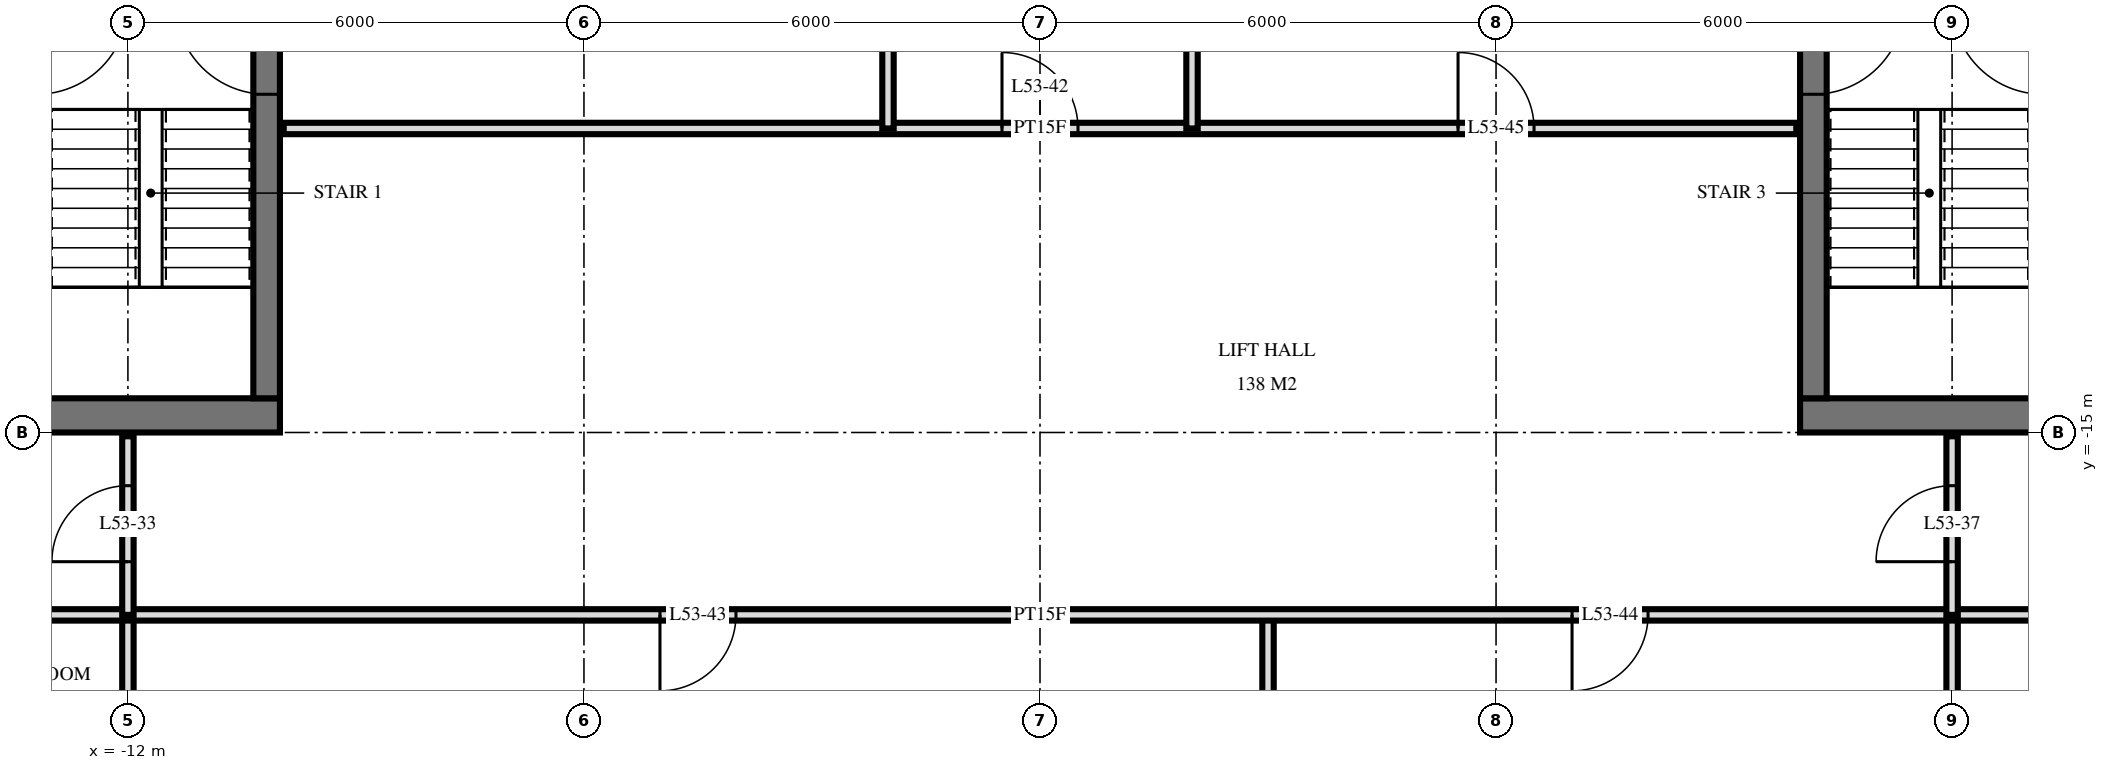
"""IFC4 building model, lengths in metres.
Left out: names, types, materials, properties, quantities, classifications, styles, units other than length and angle.
Written with IfcOpenShell. Run it as: python <this file> out.ifc"""

import sys

from ifc_helpers import new_model, si_unit, direction, frame, frame_2d, origin, place, context, subcontext, project, spatial, rectangle, extrude, element, fill, save


model = new_model("IFC4")
c1 = context("Model", 3, precision=1e-05, world=origin(), true_north=direction((0.0, 1.0)))
c2 = subcontext(c1, "Body", "Model", "MODEL_VIEW")
j1 = project(units=[si_unit("LENGTHUNIT", "METRE"), si_unit("PLANEANGLEUNIT", "RADIAN")], contexts=[c1])
p1 = place(None, origin())
s1 = spatial("IfcSite", under=j1, at=p1, CompositionType="ELEMENT")
p2 = place(p1, origin())
s2 = spatial("IfcBuilding", under=s1, at=p2, CompositionType="ELEMENT")
p3 = place(p2, frame((0.0, 0.0, 204.6)))
s3 = spatial("IfcBuildingStorey", under=s2, at=p3, CompositionType="ELEMENT", Elevation=204.6)
p4 = place(p3, frame((-24.5, -14.775, 0.0), z_axis=(0.0, 0.0, 1.0), x_axis=(1.0, 0.0, 0.0)))
e1 = element("IfcWall", 1, at=p4, inside=s3, PredefinedType="SHEAR", context=c2, shape_type="SweptSolid", body=[
    extrude(rectangle(XDim=14.5, YDim=0.45, at=frame_2d((7.25, 0.0))), origin(), (0.0, 0.0, 1.0), 3.5),
])
p5 = place(p4, frame((6.2, 0.0, 0.0)))
e2 = element("IfcOpeningElement", 2, at=p5, cuts=e1, PredefinedType="OPENING", context=c2, shape_type="SweptSolid", body=[
    extrude(rectangle(XDim=1.2, YDim=2.1, at=frame_2d((0.6, 1.05))), frame((0.0, 0.235, 0.0), z_axis=(0.0, -1.0, 0.0), x_axis=(1.0, 0.0, 0.0)), (0.0, 0.0, 1.0), 0.47),
])
p6 = place(p4, frame((9.25, 0.0, 0.0)))
e3 = element("IfcOpeningElement", 3, at=p6, cuts=e1, PredefinedType="OPENING", context=c2, shape_type="SweptSolid", body=[
    extrude(rectangle(XDim=1.1, YDim=2.1, at=frame_2d((0.55, 1.05))), frame((0.0, 0.235, 0.0), z_axis=(0.0, -1.0, 0.0), x_axis=(1.0, 0.0, 0.0)), (0.0, 0.0, 1.0), 0.47),
])
p7 = place(p4, frame((3.5, 0.0, 0.0)))
e4 = element("IfcOpeningElement", 4, at=p7, cuts=e1, PredefinedType="OPENING", context=c2, shape_type="SweptSolid", body=[
    extrude(rectangle(XDim=0.9, YDim=2.1, at=frame_2d((0.45, 1.05))), frame((0.0, 0.235, 0.0), z_axis=(0.0, -1.0, 0.0), x_axis=(1.0, 0.0, 0.0)), (0.0, 0.0, 1.0), 0.47),
])
p8 = place(p4, frame((1.05, 0.0, 0.0)))
e5 = element("IfcOpeningElement", 5, at=p8, cuts=e1, PredefinedType="OPENING", context=c2, shape_type="SweptSolid", body=[
    extrude(rectangle(XDim=1.0, YDim=2.1, at=frame_2d((0.5, 1.05))), frame((0.0, 0.235, 0.0), z_axis=(0.0, -1.0, 0.0), x_axis=(1.0, 0.0, 0.0)), (0.0, 0.0, 1.0), 0.47),
])
p9 = place(p3, frame((-10.175, -14.55, 0.0), z_axis=(0.0, 0.0, 1.0), x_axis=(0.0, 1.0, 0.0)))
e6 = element("IfcWall", 6, at=p9, inside=s3, PredefinedType="SHEAR", context=c2, shape_type="SweptSolid", body=[
    extrude(rectangle(XDim=14.1, YDim=0.35, at=frame_2d((7.05, 0.0))), origin(), (0.0, 0.0, 1.0), 3.5),
])
p10 = place(p9, frame((8.4, 0.0, 0.0)))
e7 = element("IfcOpeningElement", 7, at=p10, cuts=e6, PredefinedType="OPENING", context=c2, shape_type="SweptSolid", body=[
    extrude(rectangle(XDim=1.4, YDim=2.4, at=frame_2d((0.7, 1.2))), frame((0.0, 0.185, 0.0), z_axis=(0.0, -1.0, 0.0), x_axis=(1.0, 0.0, 0.0)), (0.0, 0.0, 1.0), 0.37),
])
p11 = place(p9, frame((10.0, 0.0, 0.0)))
e8 = element("IfcOpeningElement", 8, at=p11, cuts=e6, PredefinedType="OPENING", context=c2, shape_type="SweptSolid", body=[
    extrude(rectangle(XDim=1.4, YDim=2.4, at=frame_2d((0.7, 1.2))), frame((0.0, 0.185, 0.0), z_axis=(0.0, -1.0, 0.0), x_axis=(1.0, 0.0, 0.0)), (0.0, 0.0, 1.0), 0.37),
])
p12 = place(p9, frame((4.0, 0.0, 0.0)))
e9 = element("IfcOpeningElement", 9, at=p12, cuts=e6, PredefinedType="OPENING", context=c2, shape_type="SweptSolid", body=[
    extrude(rectangle(XDim=1.2, YDim=2.1, at=frame_2d((0.6, 1.05))), frame((0.0, 0.185, 0.0), z_axis=(0.0, -1.0, 0.0), x_axis=(1.0, 0.0, 0.0)), (0.0, 0.0, 1.0), 0.37),
])
p13 = place(p3, frame((10.0, -14.775, 0.0), z_axis=(0.0, 0.0, 1.0), x_axis=(1.0, 0.0, 0.0)))
e10 = element("IfcWall", 10, at=p13, inside=s3, PredefinedType="SHEAR", context=c2, shape_type="SweptSolid", body=[
    extrude(rectangle(XDim=14.5, YDim=0.45, at=frame_2d((7.25, 0.0))), origin(), (0.0, 0.0, 1.0), 3.5),
])
p14 = place(p13, frame((7.1, 0.0, 0.0)))
e11 = element("IfcOpeningElement", 11, at=p14, cuts=e10, PredefinedType="OPENING", context=c2, shape_type="SweptSolid", body=[
    extrude(rectangle(XDim=1.2, YDim=2.1, at=frame_2d((0.6, 1.05))), frame((0.0, 0.235, 0.0), z_axis=(0.0, -1.0, 0.0), x_axis=(1.0, 0.0, 0.0)), (0.0, 0.0, 1.0), 0.47),
])
p15 = place(p13, frame((4.15, 0.0, 0.0)))
e12 = element("IfcOpeningElement", 12, at=p15, cuts=e10, PredefinedType="OPENING", context=c2, shape_type="SweptSolid", body=[
    extrude(rectangle(XDim=1.1, YDim=2.1, at=frame_2d((0.55, 1.05))), frame((0.0, 0.235, 0.0), z_axis=(0.0, -1.0, 0.0), x_axis=(1.0, 0.0, 0.0)), (0.0, 0.0, 1.0), 0.47),
])
p16 = place(p13, frame((10.1, 0.0, 0.0)))
e13 = element("IfcOpeningElement", 13, at=p16, cuts=e10, PredefinedType="OPENING", context=c2, shape_type="SweptSolid", body=[
    extrude(rectangle(XDim=0.9, YDim=2.1, at=frame_2d((0.45, 1.05))), frame((0.0, 0.235, 0.0), z_axis=(0.0, -1.0, 0.0), x_axis=(1.0, 0.0, 0.0)), (0.0, 0.0, 1.0), 0.47),
])
p17 = place(p13, frame((12.45, 0.0, 0.0)))
e14 = element("IfcOpeningElement", 14, at=p17, cuts=e10, PredefinedType="OPENING", context=c2, shape_type="SweptSolid", body=[
    extrude(rectangle(XDim=1.0, YDim=2.1, at=frame_2d((0.5, 1.05))), frame((0.0, 0.235, 0.0), z_axis=(0.0, -1.0, 0.0), x_axis=(1.0, 0.0, 0.0)), (0.0, 0.0, 1.0), 0.47),
])
p18 = place(p3, frame((10.175, -14.55, 0.0), z_axis=(0.0, 0.0, 1.0), x_axis=(0.0, 1.0, 0.0)))
e15 = element("IfcWall", 15, at=p18, inside=s3, PredefinedType="SHEAR", context=c2, shape_type="SweptSolid", body=[
    extrude(rectangle(XDim=14.1, YDim=0.35, at=frame_2d((7.05, 0.0))), origin(), (0.0, 0.0, 1.0), 3.5),
])
p19 = place(p18, frame((8.4, 0.0, 0.0)))
e16 = element("IfcOpeningElement", 16, at=p19, cuts=e15, PredefinedType="OPENING", context=c2, shape_type="SweptSolid", body=[
    extrude(rectangle(XDim=1.4, YDim=2.4, at=frame_2d((0.7, 1.2))), frame((0.0, 0.185, 0.0), z_axis=(0.0, -1.0, 0.0), x_axis=(1.0, 0.0, 0.0)), (0.0, 0.0, 1.0), 0.37),
])
p20 = place(p18, frame((10.0, 0.0, 0.0)))
e17 = element("IfcOpeningElement", 17, at=p20, cuts=e15, PredefinedType="OPENING", context=c2, shape_type="SweptSolid", body=[
    extrude(rectangle(XDim=1.4, YDim=2.4, at=frame_2d((0.7, 1.2))), frame((0.0, 0.185, 0.0), z_axis=(0.0, -1.0, 0.0), x_axis=(1.0, 0.0, 0.0)), (0.0, 0.0, 1.0), 0.37),
])
p21 = place(p18, frame((4.0, 0.0, 0.0)))
e18 = element("IfcOpeningElement", 18, at=p21, cuts=e15, PredefinedType="OPENING", context=c2, shape_type="SweptSolid", body=[
    extrude(rectangle(XDim=1.2, YDim=2.1, at=frame_2d((0.6, 1.05))), frame((0.0, 0.185, 0.0), z_axis=(0.0, -1.0, 0.0), x_axis=(1.0, 0.0, 0.0)), (0.0, 0.0, 1.0), 0.37),
])
p22 = place(p3, frame((12.0, -17.4, 0.0), z_axis=(0.0, 0.0, 1.0), x_axis=(0.0, 1.0, 0.0)))
e19 = element("IfcWall", 19, at=p22, inside=s3, PredefinedType="PARTITIONING", context=c2, shape_type="SweptSolid", body=[
    extrude(rectangle(XDim=2.35, YDim=0.15, at=frame_2d((1.175, 0.0))), origin(), (0.0, 0.0, 1.0), 3.22),
])
p23 = place(p22, frame((0.7, 0.0, 0.0)))
e20 = element("IfcOpeningElement", 20, at=p23, cuts=e19, PredefinedType="OPENING", context=c2, shape_type="SweptSolid", body=[
    extrude(rectangle(XDim=1.0, YDim=2.1, at=frame_2d((0.5, 1.05))), frame((0.0, 0.085, 0.0), z_axis=(0.0, -1.0, 0.0), x_axis=(1.0, 0.0, 0.0)), (0.0, 0.0, 1.0), 0.17),
])
for number, where, z_axis, x_axis in (
    (21, (12.0, -29.22, 0.0), (0.0, 0.0, 1.0), (0.0, 1.0, 0.0)),
    (22, (3.0, -29.22, 0.0), (0.0, 0.0, 1.0), (0.0, 1.0, 0.0)),
):
    element("IfcWall", number, at=place(p3, frame(where, z_axis=z_axis, x_axis=x_axis)), inside=s3, PredefinedType="PARTITIONING", context=c2, shape_type="SweptSolid", body=[
        extrude(rectangle(XDim=11.82, YDim=0.15, at=frame_2d((5.91, 0.0))), origin(), (0.0, 0.0, 1.0), 3.22),
    ])
for number, where, z_axis, x_axis in (
    (23, (2.0, -11.0, 0.0), (0.0, 0.0, 1.0), (0.0, 1.0, 0.0)),
    (24, (-2.0, -11.0, 0.0), (0.0, 0.0, 1.0), (0.0, 1.0, 0.0)),
):
    element("IfcWall", number, at=place(p3, frame(where, z_axis=z_axis, x_axis=x_axis)), inside=s3, PredefinedType="PARTITIONING", context=c2, shape_type="SweptSolid", body=[
        extrude(rectangle(XDim=4.0, YDim=0.15, at=frame_2d((2.0, 0.0))), origin(), (0.0, 0.0, 1.0), 3.22),
    ])
p24 = place(p3, frame((-12.0, -17.4, 0.0), z_axis=(0.0, 0.0, 1.0), x_axis=(0.0, 1.0, 0.0)))
e25 = element("IfcWall", 25, at=p24, inside=s3, PredefinedType="PARTITIONING", context=c2, shape_type="SweptSolid", body=[
    extrude(rectangle(XDim=2.35, YDim=0.15, at=frame_2d((1.175, 0.0))), origin(), (0.0, 0.0, 1.0), 3.22),
])
p25 = place(p24, frame((0.7, 0.0, 0.0)))
e26 = element("IfcOpeningElement", 26, at=p25, cuts=e25, PredefinedType="OPENING", context=c2, shape_type="SweptSolid", body=[
    extrude(rectangle(XDim=1.0, YDim=2.1, at=frame_2d((0.5, 1.05))), frame((0.0, 0.085, 0.0), z_axis=(0.0, -1.0, 0.0), x_axis=(1.0, 0.0, 0.0)), (0.0, 0.0, 1.0), 0.17),
])
p26 = place(p3, frame((-12.0, -29.22, 0.0), z_axis=(0.0, 0.0, 1.0), x_axis=(0.0, 1.0, 0.0)))
e27 = element("IfcWall", 27, at=p26, inside=s3, PredefinedType="PARTITIONING", context=c2, shape_type="SweptSolid", body=[
    extrude(rectangle(XDim=11.82, YDim=0.15, at=frame_2d((5.91, 0.0))), origin(), (0.0, 0.0, 1.0), 3.22),
])
p27 = place(p3, frame((-26.82, -17.4, 0.0), z_axis=(0.0, 0.0, 1.0), x_axis=(1.0, 0.0, 0.0)))
e28 = element("IfcWall", 28, at=p27, inside=s3, PredefinedType="PARTITIONING", context=c2, shape_type="SweptSolid", body=[
    extrude(rectangle(XDim=53.64, YDim=0.15, at=frame_2d((26.82, 0.0))), origin(), (0.0, 0.0, 1.0), 3.22),
])
p28 = place(p27, frame((4.92, 0.0, 0.0)))
e29 = element("IfcOpeningElement", 29, at=p28, cuts=e28, PredefinedType="OPENING", context=c2, shape_type="SweptSolid", body=[
    extrude(rectangle(XDim=1.0, YDim=2.1, at=frame_2d((0.5, 1.05))), frame((0.0, 0.085, 0.0), z_axis=(0.0, -1.0, 0.0), x_axis=(1.0, 0.0, 0.0)), (0.0, 0.0, 1.0), 0.17),
])
p29 = place(p27, frame((1.62, 0.0, 0.0)))
e30 = element("IfcOpeningElement", 30, at=p29, cuts=e28, PredefinedType="OPENING", context=c2, shape_type="SweptSolid", body=[
    extrude(rectangle(XDim=1.0, YDim=2.1, at=frame_2d((0.5, 1.05))), frame((0.0, 0.085, 0.0), z_axis=(0.0, -1.0, 0.0), x_axis=(1.0, 0.0, 0.0)), (0.0, 0.0, 1.0), 0.17),
])
p30 = place(p27, frame((41.17, 0.0, 0.0)))
e31 = element("IfcOpeningElement", 31, at=p30, cuts=e28, PredefinedType="OPENING", context=c2, shape_type="SweptSolid", body=[
    extrude(rectangle(XDim=1.0, YDim=2.1, at=frame_2d((0.5, 1.05))), frame((0.0, 0.085, 0.0), z_axis=(0.0, -1.0, 0.0), x_axis=(1.0, 0.0, 0.0)), (0.0, 0.0, 1.0), 0.17),
])
p31 = place(p27, frame((49.42, 0.0, 0.0)))
e32 = element("IfcOpeningElement", 32, at=p31, cuts=e28, PredefinedType="OPENING", context=c2, shape_type="SweptSolid", body=[
    extrude(rectangle(XDim=1.0, YDim=2.1, at=frame_2d((0.5, 1.05))), frame((0.0, 0.085, 0.0), z_axis=(0.0, -1.0, 0.0), x_axis=(1.0, 0.0, 0.0)), (0.0, 0.0, 1.0), 0.17),
])
p32 = place(p27, frame((47.62, 0.0, 0.0)))
e33 = element("IfcOpeningElement", 33, at=p32, cuts=e28, PredefinedType="OPENING", context=c2, shape_type="SweptSolid", body=[
    extrude(rectangle(XDim=1.0, YDim=2.1, at=frame_2d((0.5, 1.05))), frame((0.0, 0.085, 0.0), z_axis=(0.0, -1.0, 0.0), x_axis=(1.0, 0.0, 0.0)), (0.0, 0.0, 1.0), 0.17),
])
p33 = place(p27, frame((21.82, 0.0, 0.0)))
e34 = element("IfcOpeningElement", 34, at=p33, cuts=e28, PredefinedType="OPENING", context=c2, shape_type="SweptSolid", body=[
    extrude(rectangle(XDim=1.0, YDim=2.1, at=frame_2d((0.5, 1.05))), frame((0.0, 0.085, 0.0), z_axis=(0.0, -1.0, 0.0), x_axis=(1.0, 0.0, 0.0)), (0.0, 0.0, 1.0), 0.17),
])
p34 = place(p27, frame((33.82, 0.0, 0.0)))
e35 = element("IfcOpeningElement", 35, at=p34, cuts=e28, PredefinedType="OPENING", context=c2, shape_type="SweptSolid", body=[
    extrude(rectangle(XDim=1.0, YDim=2.1, at=frame_2d((0.5, 1.05))), frame((0.0, 0.085, 0.0), z_axis=(0.0, -1.0, 0.0), x_axis=(1.0, 0.0, 0.0)), (0.0, 0.0, 1.0), 0.17),
])
p35 = place(p3, frame((-9.95, -11.0, 0.0), z_axis=(0.0, 0.0, 1.0), x_axis=(1.0, 0.0, 0.0)))
e36 = element("IfcWall", 36, at=p35, inside=s3, PredefinedType="PARTITIONING", context=c2, shape_type="SweptSolid", body=[
    extrude(rectangle(XDim=19.9, YDim=0.15, at=frame_2d((9.95, 0.0))), origin(), (0.0, 0.0, 1.0), 3.22),
])
p36 = place(p35, frame((9.45, 0.0, 0.0)))
e37 = element("IfcOpeningElement", 37, at=p36, cuts=e36, PredefinedType="OPENING", context=c2, shape_type="SweptSolid", body=[
    extrude(rectangle(XDim=1.0, YDim=2.1, at=frame_2d((0.5, 1.05))), frame((0.0, 0.085, 0.0), z_axis=(0.0, -1.0, 0.0), x_axis=(1.0, 0.0, 0.0)), (0.0, 0.0, 1.0), 0.17),
])
p37 = place(p35, frame((15.45, 0.0, 0.0)))
e38 = element("IfcOpeningElement", 38, at=p37, cuts=e36, PredefinedType="OPENING", context=c2, shape_type="SweptSolid", body=[
    extrude(rectangle(XDim=1.0, YDim=2.1, at=frame_2d((0.5, 1.05))), frame((0.0, 0.085, 0.0), z_axis=(0.0, -1.0, 0.0), x_axis=(1.0, 0.0, 0.0)), (0.0, 0.0, 1.0), 0.17),
])
p38 = place(p12, origin())
e39 = element("IfcDoor", 39, at=p38, inside=s3, OperationType="SINGLE_SWING_LEFT", PredefinedType="DOOR", context=c2, shape_type="SweptSolid", body=[
    extrude(rectangle(XDim=1.2, YDim=2.1, at=frame_2d((0.6, 1.05))), frame((0.0, 0.025, 0.0), z_axis=(0.0, -1.0, 0.0), x_axis=(1.0, 0.0, 0.0)), (0.0, 0.0, 1.0), 0.05),
])
fill(e9, e39)
p39 = place(p21, frame((0.6, 0.0, 0.0), z_axis=(0.0, 0.0, 1.0), x_axis=(-1.0, 0.0, 0.0)))
e40 = element("IfcDoor", 40, at=p39, inside=s3, OperationType="SINGLE_SWING_RIGHT", PredefinedType="DOOR", context=c2, shape_type="SweptSolid", body=[
    extrude(rectangle(XDim=1.2, YDim=2.1, at=frame_2d((0.0, 1.05))), frame((0.0, -0.025, 0.0), z_axis=(0.0, 1.0, 0.0), x_axis=(-1.0, 0.0, 0.0)), (0.0, 0.0, 1.0), 0.05),
])
fill(e18, e40)
p40 = place(p25, origin())
e41 = element("IfcDoor", 41, at=p40, inside=s3, OperationType="SINGLE_SWING_RIGHT", PredefinedType="DOOR", context=c2, shape_type="SweptSolid", body=[
    extrude(rectangle(XDim=1.0, YDim=2.1, at=frame_2d((0.5, 1.05))), frame((0.0, 0.025, 0.0), z_axis=(0.0, -1.0, 0.0), x_axis=(1.0, 0.0, 0.0)), (0.0, 0.0, 1.0), 0.05),
])
fill(e26, e41)
p41 = place(p23, origin())
e42 = element("IfcDoor", 42, at=p41, inside=s3, OperationType="SINGLE_SWING_RIGHT", PredefinedType="DOOR", context=c2, shape_type="SweptSolid", body=[
    extrude(rectangle(XDim=1.0, YDim=2.1, at=frame_2d((0.5, 1.05))), frame((0.0, 0.025, 0.0), z_axis=(0.0, -1.0, 0.0), x_axis=(1.0, 0.0, 0.0)), (0.0, 0.0, 1.0), 0.05),
])
fill(e20, e42)
p42 = place(p36, origin())
e43 = element("IfcDoor", 43, at=p42, inside=s3, OperationType="SINGLE_SWING_RIGHT", PredefinedType="DOOR", context=c2, shape_type="SweptSolid", body=[
    extrude(rectangle(XDim=1.0, YDim=2.1, at=frame_2d((0.5, 1.05))), frame((0.0, 0.025, 0.0), z_axis=(0.0, -1.0, 0.0), x_axis=(1.0, 0.0, 0.0)), (0.0, 0.0, 1.0), 0.05),
])
fill(e37, e43)
p43 = place(p33, frame((0.5, 0.0, 0.0), z_axis=(0.0, 0.0, 1.0), x_axis=(-1.0, 0.0, 0.0)))
e44 = element("IfcDoor", 44, at=p43, inside=s3, OperationType="SINGLE_SWING_LEFT", PredefinedType="DOOR", context=c2, shape_type="SweptSolid", body=[
    extrude(rectangle(XDim=1.0, YDim=2.1, at=frame_2d((0.0, 1.05))), frame((0.0, -0.025, 0.0), z_axis=(0.0, 1.0, 0.0), x_axis=(-1.0, 0.0, 0.0)), (0.0, 0.0, 1.0), 0.05),
])
fill(e34, e44)
p44 = place(p34, frame((0.5, 0.0, 0.0), z_axis=(0.0, 0.0, 1.0), x_axis=(-1.0, 0.0, 0.0)))
e45 = element("IfcDoor", 45, at=p44, inside=s3, OperationType="SINGLE_SWING_LEFT", PredefinedType="DOOR", context=c2, shape_type="SweptSolid", body=[
    extrude(rectangle(XDim=1.0, YDim=2.1, at=frame_2d((0.0, 1.05))), frame((0.0, -0.025, 0.0), z_axis=(0.0, 1.0, 0.0), x_axis=(-1.0, 0.0, 0.0)), (0.0, 0.0, 1.0), 0.05),
])
fill(e35, e45)
p45 = place(p37, origin())
e46 = element("IfcDoor", 46, at=p45, inside=s3, OperationType="SINGLE_SWING_RIGHT", PredefinedType="DOOR", context=c2, shape_type="SweptSolid", body=[
    extrude(rectangle(XDim=1.0, YDim=2.1, at=frame_2d((0.5, 1.05))), frame((0.0, 0.025, 0.0), z_axis=(0.0, -1.0, 0.0), x_axis=(1.0, 0.0, 0.0)), (0.0, 0.0, 1.0), 0.05),
])
fill(e38, e46)
save(model, sys.argv[1])
